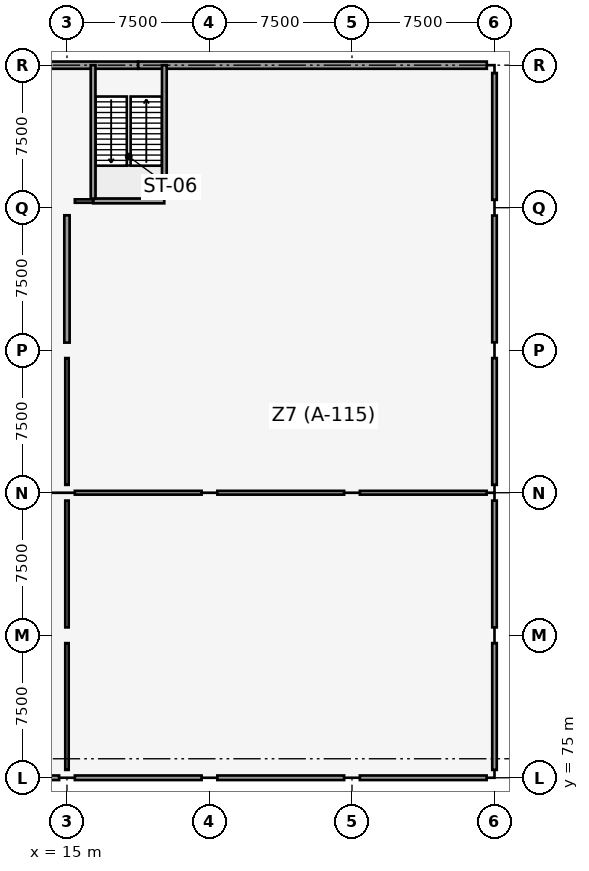
"""IFC4 building model, lengths in metres.
Left out: names, types, materials, properties, quantities, classifications, styles, units other than length and angle.
Written with IfcOpenShell. Run it as: python <this file> out.ifc"""

import sys

from ifc_helpers import new_model, si_unit, direction, frame, frame_2d, origin, origin_2d, place, context, subcontext, project, spatial, rectangle, extrude, element, fill, save


model = new_model("IFC4")
c1 = context("Model", 3, precision=1e-05, world=origin(), true_north=direction((0.0, 1.0)))
c2 = subcontext(c1, "Body", "Model", "MODEL_VIEW")
j1 = project(units=[si_unit("LENGTHUNIT", "METRE"), si_unit("PLANEANGLEUNIT", "RADIAN")], contexts=[c1])
p1 = place(None, origin())
s1 = spatial("IfcSite", under=j1, at=p1, CompositionType="ELEMENT")
p2 = place(p1, origin())
s2 = spatial("IfcBuilding", under=s1, at=p2, CompositionType="ELEMENT")
p3 = place(p2, frame((0.0, 0.0, -4.8)))
s3 = spatial("IfcBuildingStorey", under=s2, at=p3, CompositionType="ELEMENT", Elevation=-4.8)
for number, where, z_axis, x_axis in (
    (1, (15.0, 75.0, 0.0), (0.0, 0.0, 1.0), (1.0, 0.0, 0.0)),
    (2, (15.0, 82.5, 0.0), (0.0, 0.0, 1.0), (1.0, 0.0, 0.0)),
    (3, (15.0, 90.0, 0.0), (0.0, 0.0, 1.0), (1.0, 0.0, 0.0)),
    (4, (15.0, 97.5, 0.0), (0.0, 0.0, 1.0), (1.0, 0.0, 0.0)),
    (5, (15.0, 105.0, 0.0), (0.0, 0.0, 1.0), (1.0, 0.0, 0.0)),
    (6, (15.0, 112.5, 0.0), (0.0, 0.0, 1.0), (1.0, 0.0, 0.0)),
    (7, (22.5, 75.0, 0.0), (0.0, 0.0, 1.0), (1.0, 0.0, 0.0)),
    (8, (22.5, 82.5, 0.0), (0.0, 0.0, 1.0), (1.0, 0.0, 0.0)),
    (9, (22.5, 90.0, 0.0), (0.0, 0.0, 1.0), (1.0, 0.0, 0.0)),
    (10, (22.5, 97.5, 0.0), (0.0, 0.0, 1.0), (1.0, 0.0, 0.0)),
    (11, (22.5, 105.0, 0.0), (0.0, 0.0, 1.0), (1.0, 0.0, 0.0)),
    (12, (22.5, 112.5, 0.0), (0.0, 0.0, 1.0), (1.0, 0.0, 0.0)),
    (13, (30.0, 75.0, 0.0), (0.0, 0.0, 1.0), (1.0, 0.0, 0.0)),
    (14, (30.0, 82.5, 0.0), (0.0, 0.0, 1.0), (1.0, 0.0, 0.0)),
    (15, (30.0, 90.0, 0.0), (0.0, 0.0, 1.0), (1.0, 0.0, 0.0)),
    (16, (30.0, 97.5, 0.0), (0.0, 0.0, 1.0), (1.0, 0.0, 0.0)),
    (17, (30.0, 105.0, 0.0), (0.0, 0.0, 1.0), (1.0, 0.0, 0.0)),
    (18, (30.0, 112.5, 0.0), (0.0, 0.0, 1.0), (1.0, 0.0, 0.0)),
    (19, (37.5, 75.0, 0.0), (0.0, 0.0, 1.0), (1.0, 0.0, 0.0)),
    (20, (37.5, 82.5, 0.0), (0.0, 0.0, 1.0), (1.0, 0.0, 0.0)),
    (21, (37.5, 90.0, 0.0), (0.0, 0.0, 1.0), (1.0, 0.0, 0.0)),
    (22, (37.5, 97.5, 0.0), (0.0, 0.0, 1.0), (1.0, 0.0, 0.0)),
    (23, (37.5, 105.0, 0.0), (0.0, 0.0, 1.0), (1.0, 0.0, 0.0)),
    (24, (37.5, 112.5, 0.0), (0.0, 0.0, 1.0), (1.0, 0.0, 0.0)),
):
    element("IfcColumn", number, at=place(p3, frame(where, z_axis=z_axis, x_axis=x_axis)), inside=s3, PredefinedType="COLUMN", context=c2, shape_type="SweptSolid", body=[
        extrude(rectangle(XDim=0.8, YDim=0.8, at=origin_2d()), origin(), (0.0, 0.0, 1.0), 4.8),
    ])
p4 = place(p3, frame((0.415, 112.5, 0.0), z_axis=(0.0, 0.0, 1.0), x_axis=(1.0, 0.0, 0.0)))
e25 = element("IfcWall", 25, at=p4, inside=s3, PredefinedType="USERDEFINED", context=c2, shape_type="SweptSolid", body=[
    extrude(rectangle(XDim=18.335, YDim=0.38, at=frame_2d((9.167, 0.0))), origin(), (0.0, 0.0, 1.0), 4.5),
])
p5 = place(p3, frame((18.75, 112.5, 0.0), z_axis=(0.0, 0.0, 1.0), x_axis=(1.0, 0.0, 0.0)))
e26 = element("IfcWall", 26, at=p5, inside=s3, PredefinedType="USERDEFINED", context=c2, shape_type="SweptSolid", body=[
    extrude(rectangle(XDim=18.345, YDim=0.38, at=frame_2d((9.172, 0.0))), origin(), (0.0, 0.0, 1.0), 4.5),
])
p6 = place(p3, frame((15.0, 97.9, 0.0), z_axis=(0.0, 0.0, 1.0), x_axis=(0.0, 1.0, 0.0)))
e27 = element("IfcWall", 27, at=p6, inside=s3, PredefinedType="SHEAR", context=c2, shape_type="SweptSolid", body=[
    extrude(rectangle(XDim=6.7, YDim=0.28, at=frame_2d((3.35, 0.0))), origin(), (0.0, 0.0, 1.0), 4.5),
])
p7 = place(p3, frame((16.38, 105.355, 0.0), z_axis=(0.0, 0.0, 1.0), x_axis=(1.0, 0.0, 0.0)))
e28 = element("IfcWall", 28, at=p7, inside=s3, PredefinedType="SOLIDWALL", context=c2, shape_type="SweptSolid", body=[
    extrude(rectangle(XDim=3.74, YDim=0.25, at=frame_2d((1.87, 0.0))), origin(), (0.0, 0.0, 1.0), 4.5),
])
p8 = place(p3, frame((16.375, 105.48, 0.0), z_axis=(0.0, 0.0, 1.0), x_axis=(0.0, 1.0, 0.0)))
e29 = element("IfcWall", 29, at=p8, inside=s3, PredefinedType="SOLIDWALL", context=c2, shape_type="SweptSolid", body=[
    extrude(rectangle(XDim=7.02, YDim=0.25, at=frame_2d((3.51, 0.0))), origin(), (0.0, 0.0, 1.0), 4.5),
])
p9 = place(p8, frame((5.47, 0.0, 0.0)))
e30 = element("IfcOpeningElement", 30, at=p9, cuts=e29, PredefinedType="OPENING", context=c2, shape_type="SweptSolid", body=[
    extrude(rectangle(XDim=1.1, YDim=2.15, at=frame_2d((0.55, 1.075))), frame((0.0, 0.135, 0.0), z_axis=(0.0, -1.0, 0.0), x_axis=(1.0, 0.0, 0.0)), (0.0, 0.0, 1.0), 0.27),
])
p10 = place(p3, frame((20.125, 105.48, 0.0), z_axis=(0.0, 0.0, 1.0), x_axis=(0.0, 1.0, 0.0)))
e31 = element("IfcWall", 31, at=p10, inside=s3, PredefinedType="SOLIDWALL", context=c2, shape_type="SweptSolid", body=[
    extrude(rectangle(XDim=7.02, YDim=0.25, at=frame_2d((3.51, 0.0))), origin(), (0.0, 0.0, 1.0), 4.5),
])
for number, where, z_axis, x_axis in (
    (32, (7.914, 75.0, 0.0), (0.0, 0.0, 1.0), (1.0, 0.0, 0.0)),
    (33, (15.414, 75.0, 0.0), (0.0, 0.0, 1.0), (1.0, 0.0, 0.0)),
    (34, (22.914, 75.0, 0.0), (0.0, 0.0, 1.0), (1.0, 0.0, 0.0)),
):
    element("IfcWall", number, at=place(p3, frame(where, z_axis=z_axis, x_axis=x_axis)), inside=s3, PredefinedType="PARTITIONING", context=c2, shape_type="SweptSolid", body=[
        extrude(rectangle(XDim=6.672, YDim=0.24, at=frame_2d((3.336, 0.0))), origin(), (0.0, 0.0, 1.0), 3.82),
    ])
p11 = place(p3, frame((30.414, 75.0, 0.0), z_axis=(0.0, 0.0, 1.0), x_axis=(1.0, 0.0, 0.0)))
e35 = element("IfcWall", 35, at=p11, inside=s3, PredefinedType="PARTITIONING", context=c2, shape_type="SweptSolid", body=[
    extrude(rectangle(XDim=6.672, YDim=0.24, at=frame_2d((3.336, 0.0))), origin(), (0.0, 0.0, 1.0), 3.87),
])
for number, where, z_axis, x_axis in (
    (36, (37.5, 75.414, 0.0), (0.0, 0.0, 1.0), (0.0, 1.0, 0.0)),
    (37, (37.5, 82.914, 0.0), (0.0, 0.0, 1.0), (0.0, 1.0, 0.0)),
    (38, (37.5, 90.414, 0.0), (0.0, 0.0, 1.0), (0.0, 1.0, 0.0)),
    (39, (37.5, 97.914, 0.0), (0.0, 0.0, 1.0), (0.0, 1.0, 0.0)),
    (40, (37.5, 105.414, 0.0), (0.0, 0.0, 1.0), (0.0, 1.0, 0.0)),
):
    element("IfcWall", number, at=place(p3, frame(where, z_axis=z_axis, x_axis=x_axis)), inside=s3, PredefinedType="PARTITIONING", context=c2, shape_type="SweptSolid", body=[
        extrude(rectangle(XDim=6.672, YDim=0.24, at=frame_2d((3.336, 0.0))), origin(), (0.0, 0.0, 1.0), 3.42),
    ])
p12 = place(p3, frame((15.414, 105.35, 0.0), z_axis=(0.0, 0.0, 1.0), x_axis=(1.0, 0.0, 0.0)))
e41 = element("IfcWall", 41, at=p12, inside=s3, PredefinedType="PARTITIONING", context=c2, shape_type="SweptSolid", body=[
    extrude(rectangle(XDim=0.966, YDim=0.18, at=frame_2d((0.483, 0.0))), origin(), (0.0, 0.0, 1.0), 3.52),
])
p13 = place(p3, frame((15.414, 90.0, 0.0), z_axis=(0.0, 0.0, 1.0), x_axis=(1.0, 0.0, 0.0)))
e42 = element("IfcWall", 42, at=p13, inside=s3, PredefinedType="PARTITIONING", context=c2, shape_type="SweptSolid", body=[
    extrude(rectangle(XDim=6.672, YDim=0.2, at=frame_2d((3.336, 0.0))), origin(), (0.0, 0.0, 1.0), 3.52),
])
for number, where, z_axis, x_axis in (
    (43, (22.914, 90.0, 0.0), (0.0, 0.0, 1.0), (1.0, 0.0, 0.0)),
    (44, (30.414, 90.0, 0.0), (0.0, 0.0, 1.0), (1.0, 0.0, 0.0)),
):
    element("IfcWall", number, at=place(p3, frame(where, z_axis=z_axis, x_axis=x_axis)), inside=s3, PredefinedType="PARTITIONING", context=c2, shape_type="SweptSolid", body=[
        extrude(rectangle(XDim=6.672, YDim=0.2, at=frame_2d((3.336, 0.0))), origin(), (0.0, 0.0, 1.0), 3.42),
    ])
p14 = place(p3, frame((15.0, 75.414, 0.0), z_axis=(0.0, 0.0, 1.0), x_axis=(0.0, 1.0, 0.0)))
e45 = element("IfcWall", 45, at=p14, inside=s3, PredefinedType="PARTITIONING", context=c2, shape_type="SweptSolid", body=[
    extrude(rectangle(XDim=6.672, YDim=0.18, at=frame_2d((3.336, 0.0))), origin(), (0.0, 0.0, 1.0), 3.52),
])
p15 = place(p14, frame((2.536, 0.0, 0.0)))
e46 = element("IfcOpeningElement", 46, at=p15, cuts=e45, PredefinedType="OPENING", context=c2, shape_type="SweptSolid", body=[
    extrude(rectangle(XDim=1.6, YDim=2.15, at=frame_2d((0.8, 1.075))), frame((0.0, 0.1, 0.0), z_axis=(0.0, -1.0, 0.0), x_axis=(1.0, 0.0, 0.0)), (0.0, 0.0, 1.0), 0.2),
])
p16 = place(p3, frame((15.0, 82.914, 0.0), z_axis=(0.0, 0.0, 1.0), x_axis=(0.0, 1.0, 0.0)))
e47 = element("IfcWall", 47, at=p16, inside=s3, PredefinedType="PARTITIONING", context=c2, shape_type="SweptSolid", body=[
    extrude(rectangle(XDim=6.672, YDim=0.18, at=frame_2d((3.336, 0.0))), origin(), (0.0, 0.0, 1.0), 3.52),
])
p17 = place(p16, frame((2.536, 0.0, 0.0)))
e48 = element("IfcOpeningElement", 48, at=p17, cuts=e47, PredefinedType="OPENING", context=c2, shape_type="SweptSolid", body=[
    extrude(rectangle(XDim=1.6, YDim=2.15, at=frame_2d((0.8, 1.075))), frame((0.0, 0.1, 0.0), z_axis=(0.0, -1.0, 0.0), x_axis=(1.0, 0.0, 0.0)), (0.0, 0.0, 1.0), 0.2),
])
p18 = place(p3, frame((15.0, 90.414, 0.0), z_axis=(0.0, 0.0, 1.0), x_axis=(0.0, 1.0, 0.0)))
e49 = element("IfcWall", 49, at=p18, inside=s3, PredefinedType="PARTITIONING", context=c2, shape_type="SweptSolid", body=[
    extrude(rectangle(XDim=6.672, YDim=0.18, at=frame_2d((3.336, 0.0))), origin(), (0.0, 0.0, 1.0), 3.52),
])
p19 = place(p18, frame((2.736, 0.0, 0.0)))
e50 = element("IfcOpeningElement", 50, at=p19, cuts=e49, PredefinedType="OPENING", context=c2, shape_type="SweptSolid", body=[
    extrude(rectangle(XDim=1.2, YDim=2.15, at=frame_2d((0.6, 1.075))), frame((0.0, 0.1, 0.0), z_axis=(0.0, -1.0, 0.0), x_axis=(1.0, 0.0, 0.0)), (0.0, 0.0, 1.0), 0.2),
])
p20 = place(p9, origin())
e51 = element("IfcDoor", 51, at=p20, inside=s3, OperationType="SINGLE_SWING_RIGHT", PredefinedType="DOOR", context=c2, shape_type="SweptSolid", body=[
    extrude(rectangle(XDim=1.1, YDim=2.15, at=frame_2d((0.55, 1.075))), frame((0.0, 0.025, 0.0), z_axis=(0.0, -1.0, 0.0), x_axis=(1.0, 0.0, 0.0)), (0.0, 0.0, 1.0), 0.05),
])
fill(e30, e51)
p21 = place(p15, origin())
e52 = element("IfcDoor", 52, at=p21, inside=s3, OperationType="SINGLE_SWING_LEFT", PredefinedType="DOOR", context=c2, shape_type="SweptSolid", body=[
    extrude(rectangle(XDim=1.6, YDim=2.15, at=frame_2d((0.8, 1.075))), frame((0.0, 0.025, 0.0), z_axis=(0.0, -1.0, 0.0), x_axis=(1.0, 0.0, 0.0)), (0.0, 0.0, 1.0), 0.05),
])
fill(e46, e52)
p22 = place(p17, origin())
e53 = element("IfcDoor", 53, at=p22, inside=s3, OperationType="SINGLE_SWING_RIGHT", PredefinedType="DOOR", context=c2, shape_type="SweptSolid", body=[
    extrude(rectangle(XDim=1.6, YDim=2.15, at=frame_2d((0.8, 1.075))), frame((0.0, 0.025, 0.0), z_axis=(0.0, -1.0, 0.0), x_axis=(1.0, 0.0, 0.0)), (0.0, 0.0, 1.0), 0.05),
])
fill(e48, e53)
p23 = place(p19, origin())
e54 = element("IfcDoor", 54, at=p23, inside=s3, OperationType="SINGLE_SWING_LEFT", PredefinedType="DOOR", context=c2, shape_type="SweptSolid", body=[
    extrude(rectangle(XDim=1.2, YDim=2.15, at=frame_2d((0.6, 1.075))), frame((0.0, 0.025, 0.0), z_axis=(0.0, -1.0, 0.0), x_axis=(1.0, 0.0, 0.0)), (0.0, 0.0, 1.0), 0.05),
])
fill(e50, e54)
save(model, sys.argv[1])
